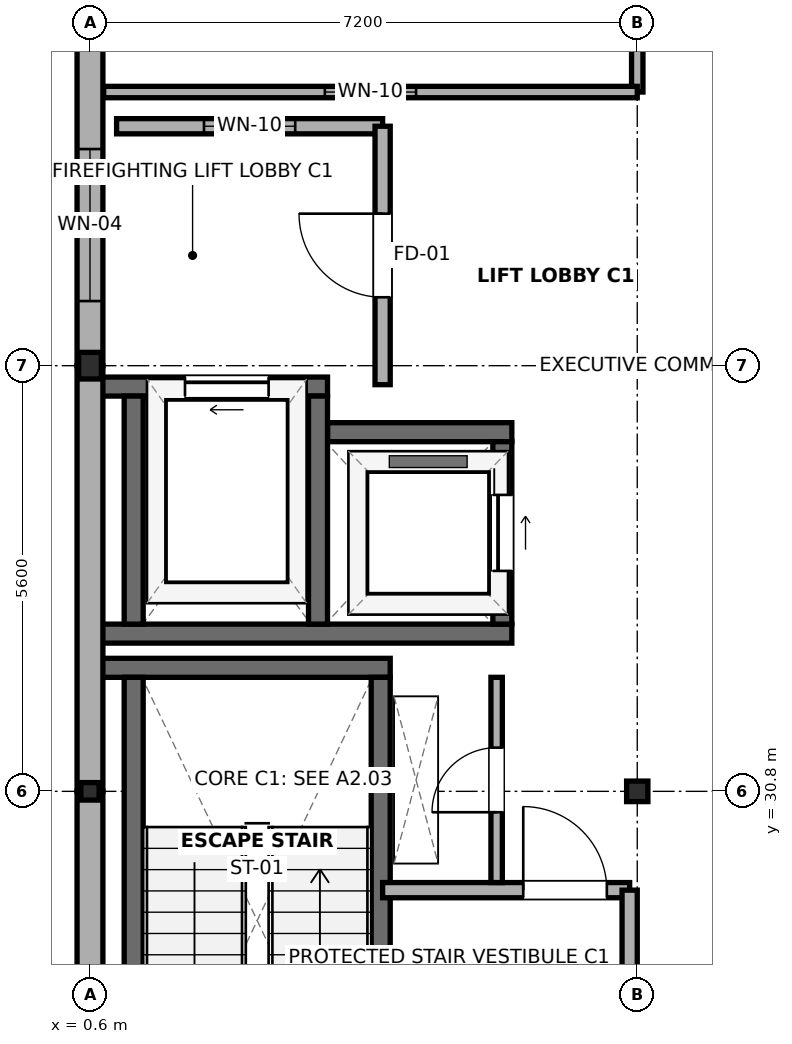
"""IFC4 building model, lengths in metres.
Left out: names, types, materials, properties, quantities, classifications, styles, units other than length and angle.
Written with IfcOpenShell. Run it as: python <this file> out.ifc"""

import sys

from ifc_helpers import new_model, si_unit, direction, frame, frame_2d, origin, origin_2d, place, context, subcontext, project, spatial, rectangle, i_section, extrude, element, fill, save


model = new_model("IFC4")
c1 = context("Model", 3, precision=1e-05, world=origin(), true_north=direction((0.0, 1.0)))
c2 = subcontext(c1, "Body", "Model", "MODEL_VIEW")
j1 = project(units=[si_unit("LENGTHUNIT", "METRE"), si_unit("PLANEANGLEUNIT", "RADIAN")], contexts=[c1])
p1 = place(None, origin())
s1 = spatial("IfcSite", under=j1, at=p1, CompositionType="ELEMENT")
p2 = place(p1, origin())
s2 = spatial("IfcBuilding", under=s1, at=p2, CompositionType="ELEMENT")
p3 = place(p2, frame((0.0, 0.0, 32.7)))
s3 = spatial("IfcBuildingStorey", under=s2, at=p3, CompositionType="ELEMENT", Elevation=32.7)
p4 = place(p3, frame((0.6, 30.8, 0.0), z_axis=(0.0, 0.0, 1.0), x_axis=(1.0, 0.0, 0.0)))
e1 = element("IfcColumn", 1, at=p4, inside=s3, PredefinedType="COLUMN", context=c2, shape_type="SweptSolid", body=[
    extrude(i_section(OverallWidth=0.24, OverallDepth=0.23, WebThickness=0.008, FlangeThickness=0.012, FilletRadius=0.021, at=origin_2d()), origin(), (0.0, 0.0, 1.0), 3.72),
])
p5 = place(p3, frame((0.6, 36.4, 0.0), z_axis=(0.0, 0.0, 1.0), x_axis=(1.0, 0.0, 0.0)))
e2 = element("IfcColumn", 2, at=p5, inside=s3, PredefinedType="COLUMN", context=c2, shape_type="SweptSolid", body=[
    extrude(i_section(OverallWidth=0.3, OverallDepth=0.35, WebThickness=0.01, FlangeThickness=0.018, FilletRadius=0.027, at=origin_2d()), origin(), (0.0, 0.0, 1.0), 3.72),
])
p6 = place(p3, frame((7.8, 30.8, 0.0), z_axis=(0.0, 0.0, 1.0), x_axis=(1.0, 0.0, 0.0)))
e3 = element("IfcColumn", 3, at=p6, inside=s3, PredefinedType="COLUMN", context=c2, shape_type="SweptSolid", body=[
    extrude(i_section(OverallWidth=0.28, OverallDepth=0.27, WebThickness=0.008, FlangeThickness=0.013, FilletRadius=0.024, at=origin_2d()), origin(), (0.0, 0.0, 1.0), 3.72),
])
p7 = place(p3, frame((7.8, 36.4, 0.0), z_axis=(0.0, 0.0, 1.0), x_axis=(1.0, 0.0, 0.0)))
e4 = element("IfcColumn", 4, at=p7, inside=s3, PredefinedType="COLUMN", context=c2, shape_type="SweptSolid", body=[
    extrude(i_section(OverallWidth=0.24, OverallDepth=0.23, WebThickness=0.008, FlangeThickness=0.012, FilletRadius=0.021, at=origin_2d()), origin(), (0.0, 0.0, 1.0), 3.72),
])
p8 = place(p3, frame((0.75, 32.425, 0.0), z_axis=(0.0, 0.0, 1.0), x_axis=(1.0, 0.0, 0.0)))
e5 = element("IfcWall", 5, at=p8, inside=s3, PredefinedType="SHEAR", context=c2, shape_type="SweptSolid", body=[
    extrude(rectangle(XDim=3.8, YDim=0.25, at=frame_2d((1.9, 0.0))), origin(), (0.0, 0.0, 1.0), 3.9),
])
p9 = place(p3, frame((1.175, 25.9, 0.0), z_axis=(0.0, 0.0, 1.0), x_axis=(0.0, 1.0, 0.0)))
e6 = element("IfcWall", 6, at=p9, inside=s3, PredefinedType="SHEAR", context=c2, shape_type="SweptSolid", body=[
    extrude(rectangle(XDim=6.4, YDim=0.25, at=frame_2d((3.2, 0.0))), origin(), (0.0, 0.0, 1.0), 3.9),
])
p10 = place(p3, frame((4.425, 25.9, 0.0), z_axis=(0.0, 0.0, 1.0), x_axis=(0.0, 1.0, 0.0)))
e7 = element("IfcWall", 7, at=p10, inside=s3, PredefinedType="SHEAR", context=c2, shape_type="SweptSolid", body=[
    extrude(rectangle(XDim=6.4, YDim=0.25, at=frame_2d((3.2, 0.0))), origin(), (0.0, 0.0, 1.0), 3.9),
])
p11 = place(p10, frame((0.17, 0.0, 0.0)))
e8 = element("IfcOpeningElement", 8, at=p11, cuts=e7, PredefinedType="OPENING", context=c2, shape_type="SweptSolid", body=[
    extrude(rectangle(XDim=1.1, YDim=2.15, at=frame_2d((0.55, 1.075))), frame((0.0, 0.14, 0.0), z_axis=(0.0, -1.0, 0.0), x_axis=(1.0, 0.0, 0.0)), (0.0, 0.0, 1.0), 0.28),
])
p12 = place(p3, frame((0.75, 32.875, 0.0), z_axis=(0.0, 0.0, 1.0), x_axis=(1.0, 0.0, 0.0)))
e9 = element("IfcWall", 9, at=p12, inside=s3, PredefinedType="SHEAR", context=c2, shape_type="SweptSolid", body=[
    extrude(rectangle(XDim=5.4, YDim=0.25, at=frame_2d((2.7, 0.0))), origin(), (0.0, 0.0, 1.0), 3.9),
])
p13 = place(p3, frame((0.75, 36.125, 0.0), z_axis=(0.0, 0.0, 1.0), x_axis=(1.0, 0.0, 0.0)))
e10 = element("IfcWall", 10, at=p13, inside=s3, PredefinedType="SHEAR", context=c2, shape_type="SweptSolid", body=[
    extrude(rectangle(XDim=2.975, YDim=0.25, at=frame_2d((1.488, 0.0))), origin(), (0.0, 0.0, 1.0), 3.9),
])
p14 = place(p13, frame((1.1, 0.0, 0.0)))
e11 = element("IfcOpeningElement", 11, at=p14, cuts=e10, PredefinedType="OPENING", context=c2, shape_type="SweptSolid", body=[
    extrude(rectangle(XDim=1.1, YDim=2.15, at=frame_2d((0.55, 1.075))), frame((0.0, 0.14, 0.0), z_axis=(0.0, -1.0, 0.0), x_axis=(1.0, 0.0, 0.0)), (0.0, 0.0, 1.0), 0.28),
])
p15 = place(p3, frame((3.725, 35.525, 0.0), z_axis=(0.0, 0.0, 1.0), x_axis=(1.0, 0.0, 0.0)))
e12 = element("IfcWall", 12, at=p15, inside=s3, PredefinedType="SHEAR", context=c2, shape_type="SweptSolid", body=[
    extrude(rectangle(XDim=2.425, YDim=0.25, at=frame_2d((1.212, 0.0))), origin(), (0.0, 0.0, 1.0), 3.9),
])
for number, where, z_axis, x_axis in (
    (13, (1.175, 33.0, 0.0), (0.0, 0.0, 1.0), (0.0, 1.0, 0.0)),
    (14, (3.6, 33.0, 0.0), (0.0, 0.0, 1.0), (0.0, 1.0, 0.0)),
):
    element("IfcWall", number, at=place(p3, frame(where, z_axis=z_axis, x_axis=x_axis)), inside=s3, PredefinedType="SHEAR", context=c2, shape_type="SweptSolid", body=[
        extrude(rectangle(XDim=3.0, YDim=0.25, at=frame_2d((1.5, 0.0))), origin(), (0.0, 0.0, 1.0), 3.9),
    ])
p16 = place(p3, frame((6.025, 33.0, 0.0), z_axis=(0.0, 0.0, 1.0), x_axis=(0.0, 1.0, 0.0)))
e15 = element("IfcWall", 15, at=p16, inside=s3, PredefinedType="SHEAR", context=c2, shape_type="SweptSolid", body=[
    extrude(rectangle(XDim=2.4, YDim=0.25, at=frame_2d((1.2, 0.0))), origin(), (0.0, 0.0, 1.0), 3.9),
])
p17 = place(p16, frame((0.7, 0.0, 0.0)))
e16 = element("IfcOpeningElement", 16, at=p17, cuts=e15, PredefinedType="OPENING", context=c2, shape_type="SweptSolid", body=[
    extrude(rectangle(XDim=1.0, YDim=2.15, at=frame_2d((0.5, 1.075))), frame((0.0, 0.14, 0.0), z_axis=(0.0, -1.0, 0.0), x_axis=(1.0, 0.0, 0.0)), (0.0, 0.0, 1.0), 0.28),
])
p18 = place(p3, frame((0.6, 25.2, 0.0), z_axis=(0.0, 0.0, 1.0), x_axis=(0.0, 1.0, 0.0)))
e17 = element("IfcWall", 17, at=p18, inside=s3, PredefinedType="SOLIDWALL", context=c2, shape_type="SweptSolid", body=[
    extrude(rectangle(XDim=5.6, YDim=0.34, at=frame_2d((2.8, 0.0))), origin(), (0.0, 0.0, 1.0), 3.115),
])
p19 = place(p3, frame((0.6, 30.8, 0.0), z_axis=(0.0, 0.0, 1.0), x_axis=(0.0, 1.0, 0.0)))
e18 = element("IfcWall", 18, at=p19, inside=s3, PredefinedType="SOLIDWALL", context=c2, shape_type="SweptSolid", body=[
    extrude(rectangle(XDim=5.6, YDim=0.34, at=frame_2d((2.8, 0.0))), origin(), (0.0, 0.0, 1.0), 3.115),
])
p20 = place(p3, frame((0.6, 36.4, 0.0), z_axis=(0.0, 0.0, 1.0), x_axis=(0.0, 1.0, 0.0)))
e19 = element("IfcWall", 19, at=p20, inside=s3, PredefinedType="SOLIDWALL", context=c2, shape_type="SweptSolid", body=[
    extrude(rectangle(XDim=5.6, YDim=0.34, at=frame_2d((2.8, 0.0))), origin(), (0.0, 0.0, 1.0), 3.115),
])
p21 = place(p20, frame((0.85, 0.0, 0.9)))
e20 = element("IfcOpeningElement", 20, at=p21, cuts=e19, PredefinedType="OPENING", context=c2, shape_type="SweptSolid", body=[
    extrude(rectangle(XDim=2.0, YDim=1.8, at=frame_2d((1.0, 0.9))), frame((0.0, 0.185, 0.0), z_axis=(0.0, -1.0, 0.0), x_axis=(1.0, 0.0, 0.0)), (0.0, 0.0, 1.0), 0.37),
])
p22 = place(p3, frame((0.95, 39.55, 0.0), z_axis=(0.0, 0.0, 1.0), x_axis=(1.0, 0.0, 0.0)))
e21 = element("IfcWall", 21, at=p22, inside=s3, PredefinedType="PARTITIONING", context=c2, shape_type="SweptSolid", body=[
    extrude(rectangle(XDim=3.5, YDim=0.2, at=frame_2d((1.75, 0.0))), origin(), (0.0, 0.0, 1.0), 3.715),
])
p23 = place(p22, frame((1.15, 0.0, 0.95)))
e22 = element("IfcOpeningElement", 22, at=p23, cuts=e21, PredefinedType="OPENING", context=c2, shape_type="SweptSolid", body=[
    extrude(rectangle(XDim=1.2, YDim=1.5, at=frame_2d((0.6, 0.75))), frame((0.0, 0.115, 0.0), z_axis=(0.0, -1.0, 0.0), x_axis=(1.0, 0.0, 0.0)), (0.0, 0.0, 1.0), 0.23),
])
p24 = place(p3, frame((4.45, 36.15, 0.0), z_axis=(0.0, 0.0, 1.0), x_axis=(0.0, 1.0, 0.0)))
e23 = element("IfcWall", 23, at=p24, inside=s3, PredefinedType="PARTITIONING", context=c2, shape_type="SweptSolid", body=[
    extrude(rectangle(XDim=3.4, YDim=0.2, at=frame_2d((1.7, 0.0))), origin(), (0.0, 0.0, 1.0), 3.115),
])
p25 = place(p24, frame((1.15, 0.0, 0.0)))
e24 = element("IfcOpeningElement", 24, at=p25, cuts=e23, PredefinedType="OPENING", context=c2, shape_type="SweptSolid", body=[
    extrude(rectangle(XDim=1.1, YDim=2.15, at=frame_2d((0.55, 1.075))), frame((0.0, 0.115, 0.0), z_axis=(0.0, -1.0, 0.0), x_axis=(1.0, 0.0, 0.0)), (0.0, 0.0, 1.0), 0.23),
])
p26 = place(p3, frame((4.45, 29.5, 0.0), z_axis=(0.0, 0.0, 1.0), x_axis=(1.0, 0.0, 0.0)))
e25 = element("IfcWall", 25, at=p26, inside=s3, PredefinedType="PARTITIONING", context=c2, shape_type="SweptSolid", body=[
    extrude(rectangle(XDim=3.25, YDim=0.2, at=frame_2d((1.625, 0.0))), origin(), (0.0, 0.0, 1.0), 3.115),
])
p27 = place(p26, frame((1.85, 0.0, 0.0)))
e26 = element("IfcOpeningElement", 26, at=p27, cuts=e25, PredefinedType="OPENING", context=c2, shape_type="SweptSolid", body=[
    extrude(rectangle(XDim=1.1, YDim=2.15, at=frame_2d((0.55, 1.075))), frame((0.0, 0.115, 0.0), z_axis=(0.0, -1.0, 0.0), x_axis=(1.0, 0.0, 0.0)), (0.0, 0.0, 1.0), 0.23),
])
p28 = place(p3, frame((7.7, 25.9, 0.0), z_axis=(0.0, 0.0, 1.0), x_axis=(0.0, 1.0, 0.0)))
e27 = element("IfcWall", 27, at=p28, inside=s3, PredefinedType="PARTITIONING", context=c2, shape_type="SweptSolid", body=[
    extrude(rectangle(XDim=3.6, YDim=0.2, at=frame_2d((1.8, 0.0))), origin(), (0.0, 0.0, 1.0), 3.115),
])
p29 = place(p28, frame((1.25, 0.0, 0.0)))
e28 = element("IfcOpeningElement", 28, at=p29, cuts=e27, PredefinedType="OPENING", context=c2, shape_type="SweptSolid", body=[
    extrude(rectangle(XDim=1.1, YDim=2.15, at=frame_2d((0.55, 1.075))), frame((0.0, 0.115, 0.0), z_axis=(0.0, -1.0, 0.0), x_axis=(1.0, 0.0, 0.0)), (0.0, 0.0, 1.0), 0.23),
])
p30 = place(p3, frame((5.95, 29.6, 0.0), z_axis=(0.0, 0.0, 1.0), x_axis=(0.0, 1.0, 0.0)))
e29 = element("IfcWall", 29, at=p30, inside=s3, PredefinedType="PARTITIONING", context=c2, shape_type="SweptSolid", body=[
    extrude(rectangle(XDim=2.7, YDim=0.15, at=frame_2d((1.35, 0.0))), origin(), (0.0, 0.0, 1.0), 3.715),
])
p31 = place(p30, frame((0.925, 0.0, 0.0)))
e30 = element("IfcOpeningElement", 30, at=p31, cuts=e29, PredefinedType="OPENING", context=c2, shape_type="SweptSolid", body=[
    extrude(rectangle(XDim=0.85, YDim=2.1, at=frame_2d((0.425, 1.05))), frame((0.0, 0.09, 0.0), z_axis=(0.0, -1.0, 0.0), x_axis=(1.0, 0.0, 0.0)), (0.0, 0.0, 1.0), 0.18),
])
p32 = place(p3, frame((7.8, 40.0, 0.0), z_axis=(0.0, 0.0, 1.0), x_axis=(0.0, 1.0, 0.0)))
e31 = element("IfcWall", 31, at=p32, inside=s3, PredefinedType="PARTITIONING", context=c2, shape_type="SweptSolid", body=[
    extrude(rectangle(XDim=22.0, YDim=0.15, at=frame_2d((11.0, 0.0))), origin(), (0.0, 0.0, 1.0), 3.115),
])
p33 = place(p32, frame((10.2, 0.0, 0.0)))
e32 = element("IfcOpeningElement", 32, at=p33, cuts=e31, PredefinedType="OPENING", context=c2, shape_type="SweptSolid", body=[
    extrude(rectangle(XDim=1.6, YDim=2.15, at=frame_2d((0.8, 1.075))), frame((0.0, 0.09, 0.0), z_axis=(0.0, -1.0, 0.0), x_axis=(1.0, 0.0, 0.0)), (0.0, 0.0, 1.0), 0.18),
])
p34 = place(p32, frame((4.2, 0.0, 0.95)))
e33 = element("IfcOpeningElement", 33, at=p34, cuts=e31, PredefinedType="OPENING", context=c2, shape_type="SweptSolid", body=[
    extrude(rectangle(XDim=2.6, YDim=1.5, at=frame_2d((1.3, 0.75))), frame((0.0, 0.09, 0.0), z_axis=(0.0, -1.0, 0.0), x_axis=(1.0, 0.0, 0.0)), (0.0, 0.0, 1.0), 0.18),
])
p35 = place(p32, frame((15.2, 0.0, 0.95)))
e34 = element("IfcOpeningElement", 34, at=p35, cuts=e31, PredefinedType="OPENING", context=c2, shape_type="SweptSolid", body=[
    extrude(rectangle(XDim=2.6, YDim=1.5, at=frame_2d((1.3, 0.75))), frame((0.0, 0.09, 0.0), z_axis=(0.0, -1.0, 0.0), x_axis=(1.0, 0.0, 0.0)), (0.0, 0.0, 1.0), 0.18),
])
p36 = place(p3, frame((0.78, 40.0, 0.0), z_axis=(0.0, 0.0, 1.0), x_axis=(1.0, 0.0, 0.0)))
e35 = element("IfcWall", 35, at=p36, inside=s3, PredefinedType="PARTITIONING", context=c2, shape_type="SweptSolid", body=[
    extrude(rectangle(XDim=7.02, YDim=0.15, at=frame_2d((3.51, 0.0))), origin(), (0.0, 0.0, 1.0), 3.165),
])
p37 = place(p36, frame((2.91, 0.0, 0.95)))
e36 = element("IfcOpeningElement", 36, at=p37, cuts=e35, PredefinedType="OPENING", context=c2, shape_type="SweptSolid", body=[
    extrude(rectangle(XDim=1.2, YDim=1.5, at=frame_2d((0.6, 0.75))), frame((0.0, 0.09, 0.0), z_axis=(0.0, -1.0, 0.0), x_axis=(1.0, 0.0, 0.0)), (0.0, 0.0, 1.0), 0.18),
])
p38 = place(p21, origin())
e37 = element("IfcWindow", 37, at=p38, inside=s3, PartitioningType="SINGLE_PANEL", PredefinedType="WINDOW", context=c2, shape_type="SweptSolid", body=[
    extrude(rectangle(XDim=2.0, YDim=1.8, at=frame_2d((1.0, 0.9))), frame((0.0, 0.03, 0.0), z_axis=(0.0, -1.0, 0.0), x_axis=(1.0, 0.0, 0.0)), (0.0, 0.0, 1.0), 0.06),
])
fill(e20, e37)
p39 = place(p14, origin())
e38 = element("IfcDoor", 38, at=p39, inside=s3, OperationType="SLIDING_TO_LEFT", PredefinedType="DOOR", context=c2, shape_type="SweptSolid", body=[
    extrude(rectangle(XDim=1.1, YDim=2.15, at=frame_2d((0.55, 1.075))), frame((0.0, 0.025, 0.0), z_axis=(0.0, -1.0, 0.0), x_axis=(1.0, 0.0, 0.0)), (0.0, 0.0, 1.0), 0.05),
])
fill(e11, e38)
p40 = place(p17, frame((1.0, 0.0, 0.0), z_axis=(0.0, 0.0, 1.0), x_axis=(-1.0, 0.0, 0.0)))
e39 = element("IfcDoor", 39, at=p40, inside=s3, OperationType="SLIDING_TO_RIGHT", PredefinedType="DOOR", context=c2, shape_type="SweptSolid", body=[
    extrude(rectangle(XDim=1.0, YDim=2.15, at=frame_2d((0.5, 1.075))), frame((0.0, 0.025, 0.0), z_axis=(0.0, -1.0, 0.0), x_axis=(1.0, 0.0, 0.0)), (0.0, 0.0, 1.0), 0.05),
])
fill(e16, e39)
p41 = place(p23, origin())
e40 = element("IfcWindow", 40, at=p41, inside=s3, PartitioningType="SINGLE_PANEL", PredefinedType="WINDOW", context=c2, shape_type="SweptSolid", body=[
    extrude(rectangle(XDim=1.2, YDim=1.5, at=frame_2d((0.6, 0.75))), frame((0.0, 0.03, 0.0), z_axis=(0.0, -1.0, 0.0), x_axis=(1.0, 0.0, 0.0)), (0.0, 0.0, 1.0), 0.06),
])
fill(e22, e40)
p42 = place(p25, origin())
e41 = element("IfcDoor", 41, at=p42, inside=s3, OperationType="SINGLE_SWING_RIGHT", PredefinedType="DOOR", context=c2, shape_type="SweptSolid", body=[
    extrude(rectangle(XDim=1.1, YDim=2.15, at=frame_2d((0.55, 1.075))), frame((0.0, 0.025, 0.0), z_axis=(0.0, -1.0, 0.0), x_axis=(1.0, 0.0, 0.0)), (0.0, 0.0, 1.0), 0.05),
])
fill(e24, e41)
p43 = place(p27, origin())
e42 = element("IfcDoor", 42, at=p43, inside=s3, OperationType="SINGLE_SWING_LEFT", PredefinedType="DOOR", context=c2, shape_type="SweptSolid", body=[
    extrude(rectangle(XDim=1.1, YDim=2.15, at=frame_2d((0.55, 1.075))), frame((0.0, 0.025, 0.0), z_axis=(0.0, -1.0, 0.0), x_axis=(1.0, 0.0, 0.0)), (0.0, 0.0, 1.0), 0.05),
])
fill(e26, e42)
p44 = place(p31, origin())
e43 = element("IfcDoor", 43, at=p44, inside=s3, OperationType="SINGLE_SWING_LEFT", PredefinedType="DOOR", context=c2, shape_type="SweptSolid", body=[
    extrude(rectangle(XDim=0.85, YDim=2.1, at=frame_2d((0.425, 1.05))), frame((0.0, 0.025, 0.0), z_axis=(0.0, -1.0, 0.0), x_axis=(1.0, 0.0, 0.0)), (0.0, 0.0, 1.0), 0.05),
])
fill(e30, e43)
p45 = place(p37, origin())
e44 = element("IfcWindow", 44, at=p45, inside=s3, PartitioningType="SINGLE_PANEL", PredefinedType="WINDOW", context=c2, shape_type="SweptSolid", body=[
    extrude(rectangle(XDim=1.2, YDim=1.5, at=frame_2d((0.6, 0.75))), frame((0.0, 0.03, 0.0), z_axis=(0.0, -1.0, 0.0), x_axis=(1.0, 0.0, 0.0)), (0.0, 0.0, 1.0), 0.06),
])
fill(e36, e44)
save(model, sys.argv[1])
